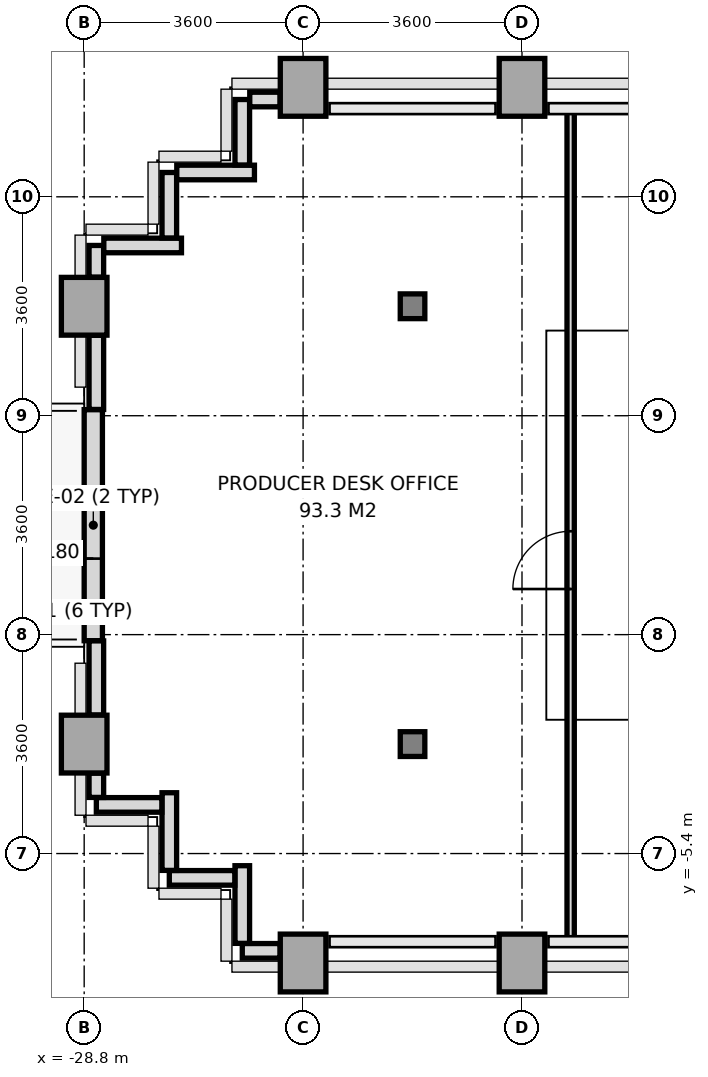
"""IFC4 building model, lengths in metres.
Left out: names, types, materials, properties, quantities, classifications, styles, units other than length and angle.
Written with IfcOpenShell. Run it as: python <this file> out.ifc"""

import sys

from ifc_helpers import new_model, si_unit, direction, frame, frame_2d, origin, origin_2d, place, context, subcontext, project, spatial, rectangle, i_section, extrude, source, transform, mapped, element, fill, save


model = new_model("IFC4")
c1 = context("Model", 3, precision=1e-05, world=origin(), true_north=direction((0.0, 1.0)))
c2 = subcontext(c1, "Body", "Model", "MODEL_VIEW")
j1 = project(units=[si_unit("LENGTHUNIT", "METRE"), si_unit("PLANEANGLEUNIT", "RADIAN")], contexts=[c1])
p1 = place(None, origin())
s1 = spatial("IfcSite", under=j1, at=p1, CompositionType="ELEMENT")
p2 = place(p1, origin())
s2 = spatial("IfcBuilding", under=s1, at=p2, CompositionType="ELEMENT")
p3 = place(p2, frame((0.0, 0.0, 40.8)))
s3 = spatial("IfcBuildingStorey", under=s2, at=p3, CompositionType="ELEMENT", Elevation=40.8)
m1 = source(origin(), c2, "Body", "SweptSolid", [
    extrude(rectangle(XDim=0.75, YDim=0.95, at=origin_2d()), origin(), (0.0, 0.0, 1.0), 3.2),
])
for number, where, z_axis, x_axis in (
    (1, (-28.8, -3.6, 0.0), (0.0, 0.0, 1.0), (1.0, 0.0, 0.0)),
    (2, (-28.8, 3.6, 0.0), (0.0, 0.0, 1.0), (1.0, 0.0, 0.0)),
    (3, (-25.2, -7.2, 0.0), (0.0, 0.0, 1.0), (1.0, 0.0, 0.0)),
    (4, (-25.2, 7.2, 0.0), (0.0, 0.0, 1.0), (1.0, 0.0, 0.0)),
):
    element("IfcColumn", number, at=place(p3, frame(where, z_axis=z_axis, x_axis=x_axis)), inside=s3, PredefinedType="COLUMN", context=c2, shape_type="MappedRepresentation", body=[
        mapped(m1, transform((0.0, 0.0, 0.0), x_axis=(1.0, 0.0, 0.0), y_axis=(0.0, 1.0, 0.0), z_axis=(0.0, 0.0, 1.0), scale=1.0)),
    ])
m2 = source(origin(), c2, "Body", "SweptSolid", [
    extrude(i_section(OverallWidth=0.404, OverallDepth=0.407, WebThickness=0.022, FlangeThickness=0.035, at=origin_2d()), origin(), (0.0, 0.0, 1.0), 3.2),
])
for number, where, z_axis, x_axis in (
    (5, (-23.4, -3.6, 0.0), (0.0, 0.0, 1.0), (1.0, 0.0, 0.0)),
    (6, (-23.4, 3.6, 0.0), (0.0, 0.0, 1.0), (1.0, 0.0, 0.0)),
):
    element("IfcColumn", number, at=place(p3, frame(where, z_axis=z_axis, x_axis=x_axis)), inside=s3, PredefinedType="COLUMN", context=c2, shape_type="MappedRepresentation", body=[
        mapped(m2, transform((0.0, 0.0, 0.0), x_axis=(1.0, 0.0, 0.0), y_axis=(0.0, 1.0, 0.0), z_axis=(0.0, 0.0, 1.0), scale=1.0)),
    ])
for number, where, z_axis, x_axis in (
    (7, (-21.6, -7.2, 0.0), (0.0, 0.0, 1.0), (1.0, 0.0, 0.0)),
    (8, (-21.6, 7.2, 0.0), (0.0, 0.0, 1.0), (1.0, 0.0, 0.0)),
):
    element("IfcColumn", number, at=place(p3, frame(where, z_axis=z_axis, x_axis=x_axis)), inside=s3, PredefinedType="COLUMN", context=c2, shape_type="MappedRepresentation", body=[
        mapped(m1, transform((0.0, 0.0, 0.0), x_axis=(1.0, 0.0, 0.0), y_axis=(0.0, 1.0, 0.0), z_axis=(0.0, 0.0, 1.0), scale=1.0)),
    ])
p4 = place(p3, frame((-28.65, -1.9, 0.0), z_axis=(0.0, 0.0, 1.0), x_axis=(0.0, 1.0, 0.0)))
e9 = element("IfcWall", 9, at=p4, inside=s3, PredefinedType="SOLIDWALL", context=c2, shape_type="SweptSolid", body=[
    extrude(rectangle(XDim=3.8, YDim=0.3, at=frame_2d((1.9, 0.0))), origin(), (0.0, 0.0, 1.0), 2.45),
])
p5 = place(p4, frame((1.35, 0.0, 0.0)))
e10 = element("IfcOpeningElement", 10, at=p5, cuts=e9, PredefinedType="OPENING", context=c2, shape_type="SweptSolid", body=[
    extrude(rectangle(XDim=1.1, YDim=2.3, at=frame_2d((0.55, 1.15))), frame((0.0, 0.16, 0.0), z_axis=(0.0, -1.0, 0.0), x_axis=(1.0, 0.0, 0.0)), (0.0, 0.0, 1.0), 0.32),
])
p6 = place(p3, frame((-25.578, -7.0, 0.0), z_axis=(0.0, 0.0, 1.0), x_axis=(-1.0, 0.0, 0.0)))
e11 = element("IfcWall", 11, at=p6, inside=s3, PredefinedType="PARAPET", context=c2, shape_type="SweptSolid", body=[
    extrude(rectangle(XDim=0.622, YDim=0.24, at=frame_2d((0.311, 0.0))), origin(), (0.0, 0.0, 1.0), 1.15),
])
p7 = place(p3, frame((-26.2, -6.877, 0.0), z_axis=(0.0, 0.0, 1.0), x_axis=(0.0, 1.0, 0.0)))
e12 = element("IfcWall", 12, at=p7, inside=s3, PredefinedType="PARAPET", context=c2, shape_type="SweptSolid", body=[
    extrude(rectangle(XDim=1.277, YDim=0.24, at=frame_2d((0.638, 0.0))), origin(), (0.0, 0.0, 1.0), 1.15),
])
p8 = place(p3, frame((-26.323, -5.8, 0.0), z_axis=(0.0, 0.0, 1.0), x_axis=(-1.0, 0.0, 0.0)))
e13 = element("IfcWall", 13, at=p8, inside=s3, PredefinedType="PARAPET", context=c2, shape_type="SweptSolid", body=[
    extrude(rectangle(XDim=1.077, YDim=0.24, at=frame_2d((0.539, 0.0))), origin(), (0.0, 0.0, 1.0), 1.15),
])
p9 = place(p3, frame((-27.4, -5.677, 0.0), z_axis=(0.0, 0.0, 1.0), x_axis=(0.0, 1.0, 0.0)))
e14 = element("IfcWall", 14, at=p9, inside=s3, PredefinedType="PARAPET", context=c2, shape_type="SweptSolid", body=[
    extrude(rectangle(XDim=1.277, YDim=0.24, at=frame_2d((0.639, 0.0))), origin(), (0.0, 0.0, 1.0), 1.15),
])
p10 = place(p3, frame((-27.523, -4.6, 0.0), z_axis=(0.0, 0.0, 1.0), x_axis=(-1.0, 0.0, 0.0)))
e15 = element("IfcWall", 15, at=p10, inside=s3, PredefinedType="PARAPET", context=c2, shape_type="SweptSolid", body=[
    extrude(rectangle(XDim=1.077, YDim=0.24, at=frame_2d((0.539, 0.0))), origin(), (0.0, 0.0, 1.0), 1.15),
])
p11 = place(p3, frame((-28.6, -4.477, 0.0), z_axis=(0.0, 0.0, 1.0), x_axis=(0.0, 1.0, 0.0)))
e16 = element("IfcWall", 16, at=p11, inside=s3, PredefinedType="PARAPET", context=c2, shape_type="SweptSolid", body=[
    extrude(rectangle(XDim=0.399, YDim=0.24, at=frame_2d((0.2, 0.0))), origin(), (0.0, 0.0, 1.0), 1.15),
])
for number, where, z_axis, x_axis in (
    (17, (-28.6, -3.122, 0.0), (0.0, 0.0, 1.0), (0.0, 1.0, 0.0)),
    (18, (-28.6, 1.903, 0.0), (0.0, 0.0, 1.0), (0.0, 1.0, 0.0)),
):
    element("IfcWall", number, at=place(p3, frame(where, z_axis=z_axis, x_axis=x_axis)), inside=s3, PredefinedType="PARAPET", context=c2, shape_type="SweptSolid", body=[
        extrude(rectangle(XDim=1.219, YDim=0.24, at=frame_2d((0.609, 0.0))), origin(), (0.0, 0.0, 1.0), 1.15),
    ])
p12 = place(p3, frame((-28.6, 4.078, 0.0), z_axis=(0.0, 0.0, 1.0), x_axis=(0.0, 1.0, 0.0)))
e19 = element("IfcWall", 19, at=p12, inside=s3, PredefinedType="PARAPET", context=c2, shape_type="SweptSolid", body=[
    extrude(rectangle(XDim=0.522, YDim=0.24, at=frame_2d((0.261, 0.0))), origin(), (0.0, 0.0, 1.0), 1.15),
])
p13 = place(p3, frame((-28.477, 4.6, 0.0), z_axis=(0.0, 0.0, 1.0), x_axis=(1.0, 0.0, 0.0)))
e20 = element("IfcWall", 20, at=p13, inside=s3, PredefinedType="PARAPET", context=c2, shape_type="SweptSolid", body=[
    extrude(rectangle(XDim=1.277, YDim=0.24, at=frame_2d((0.639, 0.0))), origin(), (0.0, 0.0, 1.0), 1.15),
])
p14 = place(p3, frame((-27.4, 4.723, 0.0), z_axis=(0.0, 0.0, 1.0), x_axis=(0.0, 1.0, 0.0)))
e21 = element("IfcWall", 21, at=p14, inside=s3, PredefinedType="PARAPET", context=c2, shape_type="SweptSolid", body=[
    extrude(rectangle(XDim=1.077, YDim=0.24, at=frame_2d((0.539, 0.0))), origin(), (0.0, 0.0, 1.0), 1.15),
])
p15 = place(p3, frame((-27.277, 5.8, 0.0), z_axis=(0.0, 0.0, 1.0), x_axis=(1.0, 0.0, 0.0)))
e22 = element("IfcWall", 22, at=p15, inside=s3, PredefinedType="PARAPET", context=c2, shape_type="SweptSolid", body=[
    extrude(rectangle(XDim=1.277, YDim=0.24, at=frame_2d((0.639, 0.0))), origin(), (0.0, 0.0, 1.0), 1.15),
])
p16 = place(p3, frame((-26.2, 5.923, 0.0), z_axis=(0.0, 0.0, 1.0), x_axis=(0.0, 1.0, 0.0)))
e23 = element("IfcWall", 23, at=p16, inside=s3, PredefinedType="PARAPET", context=c2, shape_type="SweptSolid", body=[
    extrude(rectangle(XDim=1.077, YDim=0.24, at=frame_2d((0.539, 0.0))), origin(), (0.0, 0.0, 1.0), 1.15),
])
p17 = place(p3, frame((-26.077, 7.0, 0.0), z_axis=(0.0, 0.0, 1.0), x_axis=(1.0, 0.0, 0.0)))
e24 = element("IfcWall", 24, at=p17, inside=s3, PredefinedType="PARAPET", context=c2, shape_type="SweptSolid", body=[
    extrude(rectangle(XDim=0.499, YDim=0.24, at=frame_2d((0.25, 0.0))), origin(), (0.0, 0.0, 1.0), 1.15),
])
p18 = place(p3, frame((-20.8, -6.85, 0.0), z_axis=(0.0, 0.0, 1.0), x_axis=(0.0, 1.0, 0.0)))
e25 = element("IfcWall", 25, at=p18, inside=s3, PredefinedType="PARTITIONING", context=c2, shape_type="SweptSolid", body=[
    extrude(rectangle(XDim=13.7, YDim=0.12, at=frame_2d((6.85, 0.0))), origin(), (0.0, 0.0, 1.0), 2.71),
])
p19 = place(p18, frame((5.8, 0.0, 0.0)))
e26 = element("IfcOpeningElement", 26, at=p19, cuts=e25, PredefinedType="OPENING", context=c2, shape_type="SweptSolid", body=[
    extrude(rectangle(XDim=0.95, YDim=2.15, at=frame_2d((0.475, 1.075))), frame((0.0, 0.07, 0.0), z_axis=(0.0, -1.0, 0.0), x_axis=(1.0, 0.0, 0.0)), (0.0, 0.0, 1.0), 0.14),
])
m3 = source(origin(), c2, "Body", "SweptSolid", [
    extrude(rectangle(XDim=1.1, YDim=2.3, at=frame_2d((0.55, 1.15))), frame((0.0, 0.025, 0.0), z_axis=(0.0, -1.0, 0.0), x_axis=(1.0, 0.0, 0.0)), (0.0, 0.0, 1.0), 0.05),
])
p20 = place(p5, origin())
e27 = element("IfcDoor", 27, at=p20, inside=s3, OperationType="SINGLE_SWING_LEFT", PredefinedType="DOOR", context=c2, shape_type="MappedRepresentation", body=[
    mapped(m3, transform((0.0, 0.0, 0.0), x_axis=(1.0, 0.0, 0.0), y_axis=(0.0, 1.0, 0.0), z_axis=(0.0, 0.0, 1.0), scale=1.0)),
])
fill(e10, e27)
m4 = source(origin(), c2, "Body", "SweptSolid", [
    extrude(rectangle(XDim=0.95, YDim=2.15, at=frame_2d((0.475, 1.075))), frame((0.0, 0.025, 0.0), z_axis=(0.0, -1.0, 0.0), x_axis=(1.0, 0.0, 0.0)), (0.0, 0.0, 1.0), 0.05),
])
p21 = place(p19, origin())
e28 = element("IfcDoor", 28, at=p21, inside=s3, OperationType="SINGLE_SWING_LEFT", PredefinedType="DOOR", context=c2, shape_type="MappedRepresentation", body=[
    mapped(m4, transform((0.0, 0.0, 0.0), x_axis=(1.0, 0.0, 0.0), y_axis=(0.0, 1.0, 0.0), z_axis=(0.0, 0.0, 1.0), scale=1.0)),
])
fill(e26, e28)
save(model, sys.argv[1])
